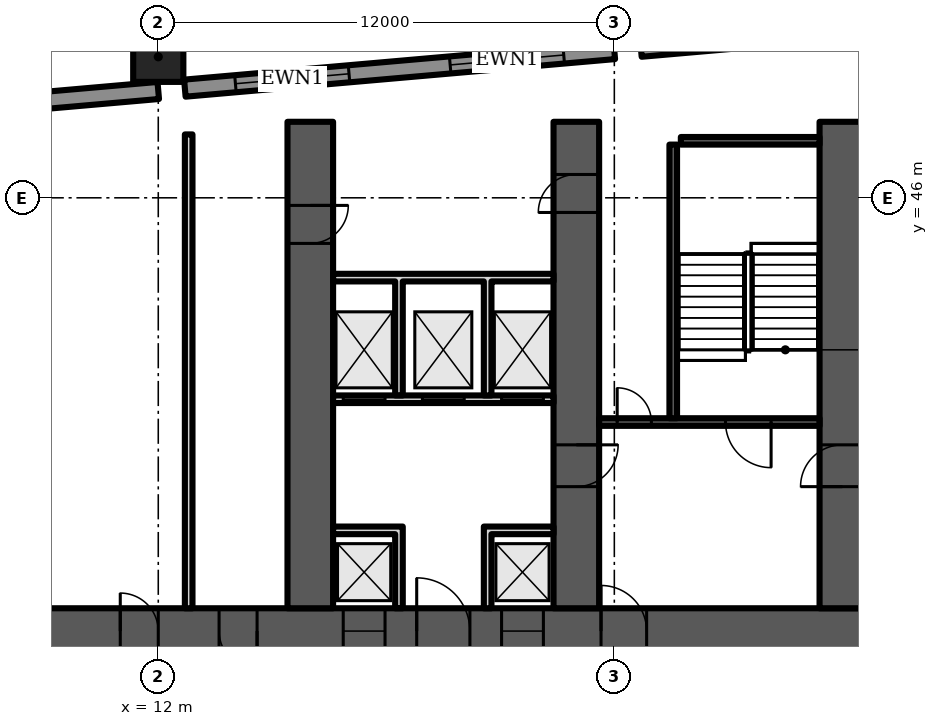
"""IFC4 building model, lengths in metres.
Left out: names, types, materials, properties, quantities, classifications, styles, units other than length and angle.
Written with IfcOpenShell. Run it as: python <this file> out.ifc"""

import sys

from ifc_helpers import new_model, si_unit, direction, frame, frame_2d, origin, origin_2d, place, context, subcontext, project, spatial, polyline, rectangle, outline, extrude, element, fill, save


model = new_model("IFC4")
c1 = context("Model", 3, precision=1e-05, world=origin(), true_north=direction((0.0, 1.0)))
c2 = subcontext(c1, "Body", "Model", "MODEL_VIEW")
j1 = project(units=[si_unit("LENGTHUNIT", "METRE"), si_unit("PLANEANGLEUNIT", "RADIAN")], contexts=[c1])
p1 = place(None, origin())
s1 = spatial("IfcSite", under=j1, at=p1, CompositionType="ELEMENT")
p2 = place(p1, origin())
s2 = spatial("IfcBuilding", under=s1, at=p2, CompositionType="ELEMENT")
p3 = place(p2, frame((0.0, 0.0, 8.0)))
s3 = spatial("IfcBuildingStorey", under=s2, at=p3, CompositionType="ELEMENT", Elevation=8.0)
p4 = place(p3, frame((12.0, 49.71, 0.0), z_axis=(0.0, 0.0, 1.0), x_axis=(1.0, 0.0, 0.0)))
e1 = element("IfcColumn", 1, at=p4, inside=s3, PredefinedType="COLUMN", context=c2, shape_type="SweptSolid", body=[
    extrude(rectangle(XDim=1.32, YDim=1.32, at=origin_2d()), origin(), (0.0, 0.0, 1.0), 7.0),
])
p5 = place(p3, frame((36.0, 50.924, 0.0), z_axis=(0.0, 0.0, 1.0), x_axis=(-0.996195, -0.087145, 0.0)))
e2 = element("IfcWall", 2, at=p5, inside=s3, PredefinedType="SOLIDWALL", context=c2, shape_type="SweptSolid", body=[
    extrude(rectangle(XDim=11.344, YDim=0.45, at=frame_2d((5.672, 0.0))), origin(), (0.0, 0.0, 1.0), 6.7),
])
p6 = place(p5, frame((1.336, 0.0, 1.0)))
e3 = element("IfcOpeningElement", 3, at=p6, cuts=e2, PredefinedType="OPENING", context=c2, shape_type="SweptSolid", body=[
    extrude(rectangle(XDim=3.0, YDim=4.7, at=frame_2d((1.5, 2.35))), frame((0.0, 0.235, 0.0), z_axis=(0.0, -1.0, 0.0), x_axis=(1.0, 0.0, 0.0)), (0.0, 0.0, 1.0), 0.47),
])
p7 = place(p5, frame((7.008, 0.0, 1.0)))
e4 = element("IfcOpeningElement", 4, at=p7, cuts=e2, PredefinedType="OPENING", context=c2, shape_type="SweptSolid", body=[
    extrude(rectangle(XDim=3.0, YDim=4.7, at=frame_2d((1.5, 2.35))), frame((0.0, 0.235, 0.0), z_axis=(0.0, -1.0, 0.0), x_axis=(1.0, 0.0, 0.0)), (0.0, 0.0, 1.0), 0.47),
])
p8 = place(p3, frame((24.0, 49.874, 0.0), z_axis=(0.0, 0.0, 1.0), x_axis=(-0.996195, -0.087145, 0.0)))
e5 = element("IfcWall", 5, at=p8, inside=s3, PredefinedType="SOLIDWALL", context=c2, shape_type="SweptSolid", body=[
    extrude(rectangle(XDim=11.344, YDim=0.45, at=frame_2d((5.672, 0.0))), origin(), (0.0, 0.0, 1.0), 6.7),
])
p9 = place(p8, frame((1.336, 0.0, 1.0)))
e6 = element("IfcOpeningElement", 6, at=p9, cuts=e5, PredefinedType="OPENING", context=c2, shape_type="SweptSolid", body=[
    extrude(rectangle(XDim=3.0, YDim=4.7, at=frame_2d((1.5, 2.35))), frame((0.0, 0.235, 0.0), z_axis=(0.0, -1.0, 0.0), x_axis=(1.0, 0.0, 0.0)), (0.0, 0.0, 1.0), 0.47),
])
p10 = place(p8, frame((7.008, 0.0, 1.0)))
e7 = element("IfcOpeningElement", 7, at=p10, cuts=e5, PredefinedType="OPENING", context=c2, shape_type="SweptSolid", body=[
    extrude(rectangle(XDim=3.0, YDim=4.7, at=frame_2d((1.5, 2.35))), frame((0.0, 0.235, 0.0), z_axis=(0.0, -1.0, 0.0), x_axis=(1.0, 0.0, 0.0)), (0.0, 0.0, 1.0), 0.47),
])
p11 = place(p3, frame((12.0, 48.824, 0.0), z_axis=(0.0, 0.0, 1.0), x_axis=(-0.9962, -0.087124, 0.0)))
e8 = element("IfcWall", 8, at=p11, inside=s3, PredefinedType="SOLIDWALL", context=c2, shape_type="SweptSolid", body=[
    extrude(rectangle(XDim=3.859, YDim=0.45, at=frame_2d((1.929, 0.0))), origin(), (0.0, 0.0, 1.0), 6.7),
])
p12 = place(p3, frame((9.0, 34.6, 0.0), z_axis=(0.0, 0.0, 1.0), x_axis=(1.0, 0.0, 0.0)))
e9 = element("IfcWall", 9, at=p12, inside=s3, PredefinedType="SHEAR", context=c2, shape_type="SweptSolid", body=[
    extrude(rectangle(XDim=56.0, YDim=1.2, at=frame_2d((28.0, 0.0))), origin(), (0.0, 0.0, 1.0), 6.7),
])
p13 = place(p12, frame((2.0, 0.0, 0.0)))
e10 = element("IfcOpeningElement", 10, at=p13, cuts=e9, PredefinedType="OPENING", context=c2, shape_type="SweptSolid", body=[
    extrude(rectangle(XDim=1.0, YDim=2.1, at=frame_2d((0.5, 1.05))), frame((0.0, 0.61, 0.0), z_axis=(0.0, -1.0, 0.0), x_axis=(1.0, 0.0, 0.0)), (0.0, 0.0, 1.0), 1.22),
])
p14 = place(p12, frame((4.6, 0.0, 0.0)))
e11 = element("IfcOpeningElement", 11, at=p14, cuts=e9, PredefinedType="OPENING", context=c2, shape_type="SweptSolid", body=[
    extrude(rectangle(XDim=1.0, YDim=2.1, at=frame_2d((0.5, 1.05))), frame((0.0, 0.61, 0.0), z_axis=(0.0, -1.0, 0.0), x_axis=(1.0, 0.0, 0.0)), (0.0, 0.0, 1.0), 1.22),
])
p15 = place(p12, frame((7.867, 0.0, 0.0)))
e12 = element("IfcOpeningElement", 12, at=p15, cuts=e9, PredefinedType="OPENING", context=c2, shape_type="SweptSolid", body=[
    extrude(rectangle(XDim=1.1, YDim=2.1, at=frame_2d((0.55, 1.05))), frame((0.0, 0.61, 0.0), z_axis=(0.0, -1.0, 0.0), x_axis=(1.0, 0.0, 0.0)), (0.0, 0.0, 1.0), 1.22),
])
p16 = place(p12, frame((12.033, 0.0, 0.0)))
e13 = element("IfcOpeningElement", 13, at=p16, cuts=e9, PredefinedType="OPENING", context=c2, shape_type="SweptSolid", body=[
    extrude(rectangle(XDim=1.1, YDim=2.1, at=frame_2d((0.55, 1.05))), frame((0.0, 0.61, 0.0), z_axis=(0.0, -1.0, 0.0), x_axis=(1.0, 0.0, 0.0)), (0.0, 0.0, 1.0), 1.22),
])
p17 = place(p12, frame((9.8, 0.0, 0.0)))
e14 = element("IfcOpeningElement", 14, at=p17, cuts=e9, PredefinedType="OPENING", context=c2, shape_type="SweptSolid", body=[
    extrude(rectangle(XDim=1.4, YDim=2.1, at=frame_2d((0.7, 1.05))), frame((0.0, 0.61, 0.0), z_axis=(0.0, -1.0, 0.0), x_axis=(1.0, 0.0, 0.0)), (0.0, 0.0, 1.0), 1.22),
])
p18 = place(p12, frame((14.65, 0.0, 0.0)))
e15 = element("IfcOpeningElement", 15, at=p18, cuts=e9, PredefinedType="OPENING", context=c2, shape_type="SweptSolid", body=[
    extrude(rectangle(XDim=1.2, YDim=2.1, at=frame_2d((0.6, 1.05))), frame((0.0, 0.61, 0.0), z_axis=(0.0, -1.0, 0.0), x_axis=(1.0, 0.0, 0.0)), (0.0, 0.0, 1.0), 1.22),
])
p19 = place(p12, frame((21.867, 0.0, 0.0)))
e16 = element("IfcOpeningElement", 16, at=p19, cuts=e9, PredefinedType="OPENING", context=c2, shape_type="SweptSolid", body=[
    extrude(rectangle(XDim=1.1, YDim=2.1, at=frame_2d((0.55, 1.05))), frame((0.0, 0.61, 0.0), z_axis=(0.0, -1.0, 0.0), x_axis=(1.0, 0.0, 0.0)), (0.0, 0.0, 1.0), 1.22),
])
p20 = place(p12, frame((26.033, 0.0, 0.0)))
e17 = element("IfcOpeningElement", 17, at=p20, cuts=e9, PredefinedType="OPENING", context=c2, shape_type="SweptSolid", body=[
    extrude(rectangle(XDim=1.1, YDim=2.1, at=frame_2d((0.55, 1.05))), frame((0.0, 0.61, 0.0), z_axis=(0.0, -1.0, 0.0), x_axis=(1.0, 0.0, 0.0)), (0.0, 0.0, 1.0), 1.22),
])
p21 = place(p12, frame((23.8, 0.0, 0.0)))
e18 = element("IfcOpeningElement", 18, at=p21, cuts=e9, PredefinedType="OPENING", context=c2, shape_type="SweptSolid", body=[
    extrude(rectangle(XDim=1.4, YDim=2.1, at=frame_2d((0.7, 1.05))), frame((0.0, 0.61, 0.0), z_axis=(0.0, -1.0, 0.0), x_axis=(1.0, 0.0, 0.0)), (0.0, 0.0, 1.0), 1.22),
])
p22 = place(p12, frame((28.867, 0.0, 0.0)))
e19 = element("IfcOpeningElement", 19, at=p22, cuts=e9, PredefinedType="OPENING", context=c2, shape_type="SweptSolid", body=[
    extrude(rectangle(XDim=1.1, YDim=2.1, at=frame_2d((0.55, 1.05))), frame((0.0, 0.61, 0.0), z_axis=(0.0, -1.0, 0.0), x_axis=(1.0, 0.0, 0.0)), (0.0, 0.0, 1.0), 1.22),
])
p23 = place(p12, frame((33.033, 0.0, 0.0)))
e20 = element("IfcOpeningElement", 20, at=p23, cuts=e9, PredefinedType="OPENING", context=c2, shape_type="SweptSolid", body=[
    extrude(rectangle(XDim=1.1, YDim=2.1, at=frame_2d((0.55, 1.05))), frame((0.0, 0.61, 0.0), z_axis=(0.0, -1.0, 0.0), x_axis=(1.0, 0.0, 0.0)), (0.0, 0.0, 1.0), 1.22),
])
p24 = place(p12, frame((40.15, 0.0, 0.0)))
e21 = element("IfcOpeningElement", 21, at=p24, cuts=e9, PredefinedType="OPENING", context=c2, shape_type="SweptSolid", body=[
    extrude(rectangle(XDim=1.2, YDim=2.1, at=frame_2d((0.6, 1.05))), frame((0.0, 0.61, 0.0), z_axis=(0.0, -1.0, 0.0), x_axis=(1.0, 0.0, 0.0)), (0.0, 0.0, 1.0), 1.22),
])
p25 = place(p12, frame((44.8, 0.0, 0.0)))
e22 = element("IfcOpeningElement", 22, at=p25, cuts=e9, PredefinedType="OPENING", context=c2, shape_type="SweptSolid", body=[
    extrude(rectangle(XDim=1.4, YDim=2.1, at=frame_2d((0.7, 1.05))), frame((0.0, 0.61, 0.0), z_axis=(0.0, -1.0, 0.0), x_axis=(1.0, 0.0, 0.0)), (0.0, 0.0, 1.0), 1.22),
])
p26 = place(p12, frame((49.867, 0.0, 0.0)))
e23 = element("IfcOpeningElement", 23, at=p26, cuts=e9, PredefinedType="OPENING", context=c2, shape_type="SweptSolid", body=[
    extrude(rectangle(XDim=1.1, YDim=2.1, at=frame_2d((0.55, 1.05))), frame((0.0, 0.61, 0.0), z_axis=(0.0, -1.0, 0.0), x_axis=(1.0, 0.0, 0.0)), (0.0, 0.0, 1.0), 1.22),
])
p27 = place(p12, frame((53.5, 0.0, 0.0)))
e24 = element("IfcOpeningElement", 24, at=p27, cuts=e9, PredefinedType="OPENING", context=c2, shape_type="SweptSolid", body=[
    extrude(rectangle(XDim=1.1, YDim=2.1, at=frame_2d((0.55, 1.05))), frame((0.0, 0.61, 0.0), z_axis=(0.0, -1.0, 0.0), x_axis=(1.0, 0.0, 0.0)), (0.0, 0.0, 1.0), 1.22),
])
p28 = place(p12, frame((51.567, 0.0, 0.0)))
e25 = element("IfcOpeningElement", 25, at=p28, cuts=e9, PredefinedType="OPENING", context=c2, shape_type="SweptSolid", body=[
    extrude(rectangle(XDim=1.4, YDim=2.1, at=frame_2d((0.7, 1.05))), frame((0.0, 0.61, 0.0), z_axis=(0.0, -1.0, 0.0), x_axis=(1.0, 0.0, 0.0)), (0.0, 0.0, 1.0), 1.22),
])
p29 = place(p3, frame((16.0, 35.2, 0.0), z_axis=(0.0, 0.0, 1.0), x_axis=(0.0, 1.0, 0.0)))
e26 = element("IfcWall", 26, at=p29, inside=s3, PredefinedType="SHEAR", context=c2, shape_type="SweptSolid", body=[
    extrude(rectangle(XDim=12.8, YDim=1.2, at=frame_2d((6.4, 0.0))), origin(), (0.0, 0.0, 1.0), 6.7),
])
p30 = place(p29, frame((9.6, 0.0, 0.0)))
e27 = element("IfcOpeningElement", 27, at=p30, cuts=e26, PredefinedType="OPENING", context=c2, shape_type="SweptSolid", body=[
    extrude(rectangle(XDim=1.0, YDim=2.1, at=frame_2d((0.5, 1.05))), frame((0.0, 0.61, 0.0), z_axis=(0.0, -1.0, 0.0), x_axis=(1.0, 0.0, 0.0)), (0.0, 0.0, 1.0), 1.22),
])
p31 = place(p3, frame((23.0, 35.2, 0.0), z_axis=(0.0, 0.0, 1.0), x_axis=(0.0, 1.0, 0.0)))
e28 = element("IfcWall", 28, at=p31, inside=s3, PredefinedType="SHEAR", context=c2, shape_type="SweptSolid", body=[
    extrude(rectangle(XDim=12.8, YDim=1.2, at=frame_2d((6.4, 0.0))), origin(), (0.0, 0.0, 1.0), 6.7),
])
p32 = place(p31, frame((10.414, 0.0, 0.0)))
e29 = element("IfcOpeningElement", 29, at=p32, cuts=e28, PredefinedType="OPENING", context=c2, shape_type="SweptSolid", body=[
    extrude(rectangle(XDim=1.0, YDim=2.1, at=frame_2d((0.5, 1.05))), frame((0.0, 0.61, 0.0), z_axis=(0.0, -1.0, 0.0), x_axis=(1.0, 0.0, 0.0)), (0.0, 0.0, 1.0), 1.22),
])
p33 = place(p31, frame((3.2, 0.0, 0.0)))
e30 = element("IfcOpeningElement", 30, at=p33, cuts=e28, PredefinedType="OPENING", context=c2, shape_type="SweptSolid", body=[
    extrude(rectangle(XDim=1.1, YDim=2.1, at=frame_2d((0.55, 1.05))), frame((0.0, 0.61, 0.0), z_axis=(0.0, -1.0, 0.0), x_axis=(1.0, 0.0, 0.0)), (0.0, 0.0, 1.0), 1.22),
])
p34 = place(p3, frame((30.0, 35.2, 0.0), z_axis=(0.0, 0.0, 1.0), x_axis=(0.0, 1.0, 0.0)))
e31 = element("IfcWall", 31, at=p34, inside=s3, PredefinedType="SHEAR", context=c2, shape_type="SweptSolid", body=[
    extrude(rectangle(XDim=12.8, YDim=1.2, at=frame_2d((6.4, 0.0))), origin(), (0.0, 0.0, 1.0), 6.7),
])
p35 = place(p34, frame((3.2, 0.0, 0.0)))
e32 = element("IfcOpeningElement", 32, at=p35, cuts=e31, PredefinedType="OPENING", context=c2, shape_type="SweptSolid", body=[
    extrude(rectangle(XDim=1.1, YDim=2.1, at=frame_2d((0.55, 1.05))), frame((0.0, 0.61, 0.0), z_axis=(0.0, -1.0, 0.0), x_axis=(1.0, 0.0, 0.0)), (0.0, 0.0, 1.0), 1.22),
])
p36 = place(p3, frame((12.8, 35.2, 0.0), z_axis=(0.0, 0.0, 1.0), x_axis=(0.0, 1.0, 0.0)))
e33 = element("IfcWall", 33, at=p36, inside=s3, PredefinedType="PARTITIONING", context=c2, shape_type="SweptSolid", body=[
    extrude(rectangle(XDim=12.468, YDim=0.2, at=frame_2d((6.234, 0.0))), origin(), (0.0, 0.0, 1.0), 6.7),
])
p37 = place(p3, frame((16.6, 40.7, 0.0), z_axis=(0.0, 0.0, 1.0), x_axis=(1.0, 0.0, 0.0)))
e34 = element("IfcWall", 34, at=p37, inside=s3, PredefinedType="PARTITIONING", context=c2, shape_type="SweptSolid", body=[
    extrude(rectangle(XDim=5.8, YDim=0.2, at=frame_2d((2.9, 0.0))), origin(), (0.0, 0.0, 1.0), 6.7),
])
p38 = place(p37, frame((0.267, 0.0, 0.0)))
e35 = element("IfcOpeningElement", 35, at=p38, cuts=e34, PredefinedType="OPENING", context=c2, shape_type="SweptSolid", body=[
    extrude(rectangle(XDim=1.1, YDim=2.1, at=frame_2d((0.55, 1.05))), frame((0.0, 0.11, 0.0), z_axis=(0.0, -1.0, 0.0), x_axis=(1.0, 0.0, 0.0)), (0.0, 0.0, 1.0), 0.22),
])
p39 = place(p37, frame((2.35, 0.0, 0.0)))
e36 = element("IfcOpeningElement", 36, at=p39, cuts=e34, PredefinedType="OPENING", context=c2, shape_type="SweptSolid", body=[
    extrude(rectangle(XDim=1.1, YDim=2.1, at=frame_2d((0.55, 1.05))), frame((0.0, 0.11, 0.0), z_axis=(0.0, -1.0, 0.0), x_axis=(1.0, 0.0, 0.0)), (0.0, 0.0, 1.0), 0.22),
])
p40 = place(p37, frame((4.433, 0.0, 0.0)))
e37 = element("IfcOpeningElement", 37, at=p40, cuts=e34, PredefinedType="OPENING", context=c2, shape_type="SweptSolid", body=[
    extrude(rectangle(XDim=1.1, YDim=2.1, at=frame_2d((0.55, 1.05))), frame((0.0, 0.11, 0.0), z_axis=(0.0, -1.0, 0.0), x_axis=(1.0, 0.0, 0.0)), (0.0, 0.0, 1.0), 0.22),
])
p41 = place(p3, frame((0.0, 0.0, -0.0)))
e38 = element("IfcWall", 38, at=p41, inside=s3, PredefinedType="PARTITIONING", context=c2, shape_type="SweptSolid", body=[
    extrude(outline(polyline([(18.233, 37.15), (16.6, 37.15), (16.6, 37.35), (18.233, 37.35), (18.433, 37.35), (18.433, 35.2), (18.233, 35.2), (18.233, 37.15)])), origin(), (0.0, 0.0, 1.0), 6.7),
])
p42 = place(p3, frame((0.0, 0.0, -0.0)))
e39 = element("IfcWall", 39, at=p42, inside=s3, PredefinedType="PARTITIONING", context=c2, shape_type="SweptSolid", body=[
    extrude(outline(polyline([(20.567, 37.35), (20.767, 37.35), (22.4, 37.35), (22.4, 37.15), (20.767, 37.15), (20.767, 35.2), (20.567, 35.2), (20.567, 37.35)])), origin(), (0.0, 0.0, 1.0), 6.7),
])
p43 = place(p3, frame((0.0, 0.0, -0.0)))
e40 = element("IfcWall", 40, at=p43, inside=s3, PredefinedType="PARTITIONING", context=c2, shape_type="SweptSolid", body=[
    extrude(outline(polyline([(18.433, 40.8), (18.233, 40.8), (18.233, 43.8), (16.6, 43.8), (16.6, 44.0), (22.4, 44.0), (22.4, 43.8), (20.767, 43.8), (20.767, 40.8), (20.567, 40.8), (20.567, 43.8), (18.433, 43.8), (18.433, 40.8)])), origin(), (0.0, 0.0, 1.0), 6.7),
])
p44 = place(p3, frame((23.6, 40.1, 0.0), z_axis=(0.0, 0.0, 1.0), x_axis=(1.0, 0.0, 0.0)))
e41 = element("IfcWall", 41, at=p44, inside=s3, PredefinedType="SHEAR", context=c2, shape_type="SweptSolid", body=[
    extrude(rectangle(XDim=5.8, YDim=0.2, at=frame_2d((2.9, 0.0))), origin(), (0.0, 0.0, 1.0), 6.7),
])
p45 = place(p44, frame((3.325, 0.0, 0.0)))
e42 = element("IfcOpeningElement", 42, at=p45, cuts=e41, PredefinedType="OPENING", context=c2, shape_type="SweptSolid", body=[
    extrude(rectangle(XDim=1.2, YDim=2.1, at=frame_2d((0.6, 1.05))), frame((0.0, 0.11, 0.0), z_axis=(0.0, -1.0, 0.0), x_axis=(1.0, 0.0, 0.0)), (0.0, 0.0, 1.0), 0.22),
])
p46 = place(p44, frame((0.475, 0.0, 0.0)))
e43 = element("IfcOpeningElement", 43, at=p46, cuts=e41, PredefinedType="OPENING", context=c2, shape_type="SweptSolid", body=[
    extrude(rectangle(XDim=0.9, YDim=2.1, at=frame_2d((0.45, 1.05))), frame((0.0, 0.11, 0.0), z_axis=(0.0, -1.0, 0.0), x_axis=(1.0, 0.0, 0.0)), (0.0, 0.0, 1.0), 0.22),
])
p47 = place(p3, frame((25.55, 40.2, 0.0), z_axis=(0.0, 0.0, 1.0), x_axis=(0.0, 1.0, 0.0)))
e44 = element("IfcWall", 44, at=p47, inside=s3, PredefinedType="SHEAR", context=c2, shape_type="SweptSolid", body=[
    extrude(rectangle(XDim=7.2, YDim=0.2, at=frame_2d((3.6, 0.0))), origin(), (0.0, 0.0, 1.0), 6.7),
])
p48 = place(p3, frame((25.75, 47.5, 0.0), z_axis=(0.0, 0.0, 1.0), x_axis=(1.0, 0.0, 0.0)))
e45 = element("IfcWall", 45, at=p48, inside=s3, PredefinedType="SHEAR", context=c2, shape_type="SweptSolid", body=[
    extrude(rectangle(XDim=3.65, YDim=0.2, at=frame_2d((1.825, 0.0))), origin(), (0.0, 0.0, 1.0), 6.7),
])
p49 = place(p9, origin())
e46 = element("IfcWindow", 46, at=p49, inside=s3, PartitioningType="SINGLE_PANEL", PredefinedType="WINDOW", context=c2, shape_type="SweptSolid", body=[
    extrude(rectangle(XDim=3.0, YDim=4.7, at=frame_2d((1.5, 2.35))), frame((0.0, 0.105, 0.0), z_axis=(0.0, -1.0, 0.0), x_axis=(1.0, 0.0, 0.0)), (0.0, 0.0, 1.0), 0.06),
])
fill(e6, e46)
p50 = place(p10, origin())
e47 = element("IfcWindow", 47, at=p50, inside=s3, PartitioningType="SINGLE_PANEL", PredefinedType="WINDOW", context=c2, shape_type="SweptSolid", body=[
    extrude(rectangle(XDim=3.0, YDim=4.7, at=frame_2d((1.5, 2.35))), frame((0.0, 0.105, 0.0), z_axis=(0.0, -1.0, 0.0), x_axis=(1.0, 0.0, 0.0)), (0.0, 0.0, 1.0), 0.06),
])
fill(e7, e47)
p51 = place(p13, origin())
e48 = element("IfcDoor", 48, at=p51, inside=s3, OperationType="SINGLE_SWING_LEFT", PredefinedType="DOOR", context=c2, shape_type="SweptSolid", body=[
    extrude(rectangle(XDim=1.0, YDim=2.1, at=frame_2d((0.5, 1.05))), frame((0.0, 0.6, 0.0), z_axis=(0.0, -1.0, 0.0), x_axis=(1.0, 0.0, 0.0)), (0.0, 0.0, 1.0), 1.199),
])
fill(e10, e48)
p52 = place(p14, origin())
e49 = element("IfcDoor", 49, at=p52, inside=s3, OperationType="SINGLE_SWING_RIGHT", PredefinedType="DOOR", context=c2, shape_type="SweptSolid", body=[
    extrude(rectangle(XDim=1.0, YDim=2.1, at=frame_2d((0.5, 1.05))), frame((0.0, 0.6, 0.0), z_axis=(0.0, -1.0, 0.0), x_axis=(1.0, 0.0, 0.0)), (0.0, 0.0, 1.0), 1.199),
])
fill(e11, e49)
p53 = place(p15, origin())
e50 = element("IfcDoor", 50, at=p53, inside=s3, OperationType="DOUBLE_DOOR_SLIDING", PredefinedType="DOOR", context=c2, shape_type="SweptSolid", body=[
    extrude(rectangle(XDim=1.1, YDim=2.1, at=frame_2d((0.55, 1.05))), frame((0.0, 0.025, 0.0), z_axis=(0.0, -1.0, 0.0), x_axis=(1.0, 0.0, 0.0)), (0.0, 0.0, 1.0), 0.05),
])
fill(e12, e50)
p54 = place(p16, origin())
e51 = element("IfcDoor", 51, at=p54, inside=s3, OperationType="DOUBLE_DOOR_SLIDING", PredefinedType="DOOR", context=c2, shape_type="SweptSolid", body=[
    extrude(rectangle(XDim=1.1, YDim=2.1, at=frame_2d((0.55, 1.05))), frame((0.0, 0.025, 0.0), z_axis=(0.0, -1.0, 0.0), x_axis=(1.0, 0.0, 0.0)), (0.0, 0.0, 1.0), 0.05),
])
fill(e13, e51)
p55 = place(p17, origin())
e52 = element("IfcDoor", 52, at=p55, inside=s3, OperationType="DOUBLE_DOOR_SINGLE_SWING", PredefinedType="DOOR", context=c2, shape_type="SweptSolid", body=[
    extrude(rectangle(XDim=1.4, YDim=2.1, at=frame_2d((0.7, 1.05))), frame((0.0, 0.025, 0.0), z_axis=(0.0, -1.0, 0.0), x_axis=(1.0, 0.0, 0.0)), (0.0, 0.0, 1.0), 0.05),
])
fill(e14, e52)
p56 = place(p38, origin())
e53 = element("IfcDoor", 53, at=p56, inside=s3, OperationType="DOUBLE_DOOR_SLIDING", PredefinedType="DOOR", context=c2, shape_type="SweptSolid", body=[
    extrude(rectangle(XDim=1.1, YDim=2.1, at=frame_2d((0.55, 1.05))), frame((0.0, 0.025, 0.0), z_axis=(0.0, -1.0, 0.0), x_axis=(1.0, 0.0, 0.0)), (0.0, 0.0, 1.0), 0.05),
])
fill(e35, e53)
p57 = place(p39, origin())
e54 = element("IfcDoor", 54, at=p57, inside=s3, OperationType="DOUBLE_DOOR_SLIDING", PredefinedType="DOOR", context=c2, shape_type="SweptSolid", body=[
    extrude(rectangle(XDim=1.1, YDim=2.1, at=frame_2d((0.55, 1.05))), frame((0.0, 0.025, 0.0), z_axis=(0.0, -1.0, 0.0), x_axis=(1.0, 0.0, 0.0)), (0.0, 0.0, 1.0), 0.05),
])
fill(e36, e54)
p58 = place(p40, origin())
e55 = element("IfcDoor", 55, at=p58, inside=s3, OperationType="DOUBLE_DOOR_SLIDING", PredefinedType="DOOR", context=c2, shape_type="SweptSolid", body=[
    extrude(rectangle(XDim=1.1, YDim=2.1, at=frame_2d((0.55, 1.05))), frame((0.0, 0.025, 0.0), z_axis=(0.0, -1.0, 0.0), x_axis=(1.0, 0.0, 0.0)), (0.0, 0.0, 1.0), 0.05),
])
fill(e37, e55)
p59 = place(p32, origin())
e56 = element("IfcDoor", 56, at=p59, inside=s3, OperationType="SINGLE_SWING_LEFT", PredefinedType="DOOR", context=c2, shape_type="SweptSolid", body=[
    extrude(rectangle(XDim=1.0, YDim=2.1, at=frame_2d((0.5, 1.05))), frame((0.0, 0.6, 0.0), z_axis=(0.0, -1.0, 0.0), x_axis=(1.0, 0.0, 0.0)), (0.0, 0.0, 1.0), 1.199),
])
fill(e29, e56)
p60 = place(p45, origin())
e57 = element("IfcDoor", 57, at=p60, inside=s3, OperationType="SINGLE_SWING_RIGHT", PredefinedType="DOOR", context=c2, shape_type="SweptSolid", body=[
    extrude(rectangle(XDim=1.2, YDim=2.1, at=frame_2d((0.6, 1.05))), frame((0.0, 0.025, 0.0), z_axis=(0.0, -1.0, 0.0), x_axis=(1.0, 0.0, 0.0)), (0.0, 0.0, 1.0), 0.05),
])
fill(e42, e57)
p61 = place(p46, origin())
e58 = element("IfcDoor", 58, at=p61, inside=s3, OperationType="SINGLE_SWING_LEFT", PredefinedType="DOOR", context=c2, shape_type="SweptSolid", body=[
    extrude(rectangle(XDim=0.9, YDim=2.1, at=frame_2d((0.45, 1.05))), frame((0.0, 0.025, 0.0), z_axis=(0.0, -1.0, 0.0), x_axis=(1.0, 0.0, 0.0)), (0.0, 0.0, 1.0), 0.05),
])
fill(e43, e58)
p62 = place(p18, origin())
e59 = element("IfcDoor", 59, at=p62, inside=s3, OperationType="SINGLE_SWING_LEFT", PredefinedType="DOOR", context=c2, shape_type="SweptSolid", body=[
    extrude(rectangle(XDim=1.2, YDim=2.1, at=frame_2d((0.6, 1.05))), frame((0.0, 0.025, 0.0), z_axis=(0.0, -1.0, 0.0), x_axis=(1.0, 0.0, 0.0)), (0.0, 0.0, 1.0), 0.05),
])
fill(e15, e59)
p63 = place(p30, origin())
e60 = element("IfcDoor", 60, at=p63, inside=s3, OperationType="SINGLE_SWING_RIGHT", PredefinedType="DOOR", context=c2, shape_type="SweptSolid", body=[
    extrude(rectangle(XDim=1.0, YDim=2.1, at=frame_2d((0.5, 1.05))), frame((0.0, 0.6, 0.0), z_axis=(0.0, -1.0, 0.0), x_axis=(1.0, 0.0, 0.0)), (0.0, 0.0, 1.0), 1.199),
])
fill(e27, e60)
p64 = place(p33, origin())
e61 = element("IfcDoor", 61, at=p64, inside=s3, OperationType="SINGLE_SWING_RIGHT", PredefinedType="DOOR", context=c2, shape_type="SweptSolid", body=[
    extrude(rectangle(XDim=1.1, YDim=2.1, at=frame_2d((0.55, 1.05))), frame((0.0, 0.025, 0.0), z_axis=(0.0, -1.0, 0.0), x_axis=(1.0, 0.0, 0.0)), (0.0, 0.0, 1.0), 0.05),
])
fill(e30, e61)
p65 = place(p35, origin())
e62 = element("IfcDoor", 62, at=p65, inside=s3, OperationType="SINGLE_SWING_LEFT", PredefinedType="DOOR", context=c2, shape_type="SweptSolid", body=[
    extrude(rectangle(XDim=1.1, YDim=2.1, at=frame_2d((0.55, 1.05))), frame((0.0, 0.025, 0.0), z_axis=(0.0, -1.0, 0.0), x_axis=(1.0, 0.0, 0.0)), (0.0, 0.0, 1.0), 0.05),
])
fill(e32, e62)
save(model, sys.argv[1])
